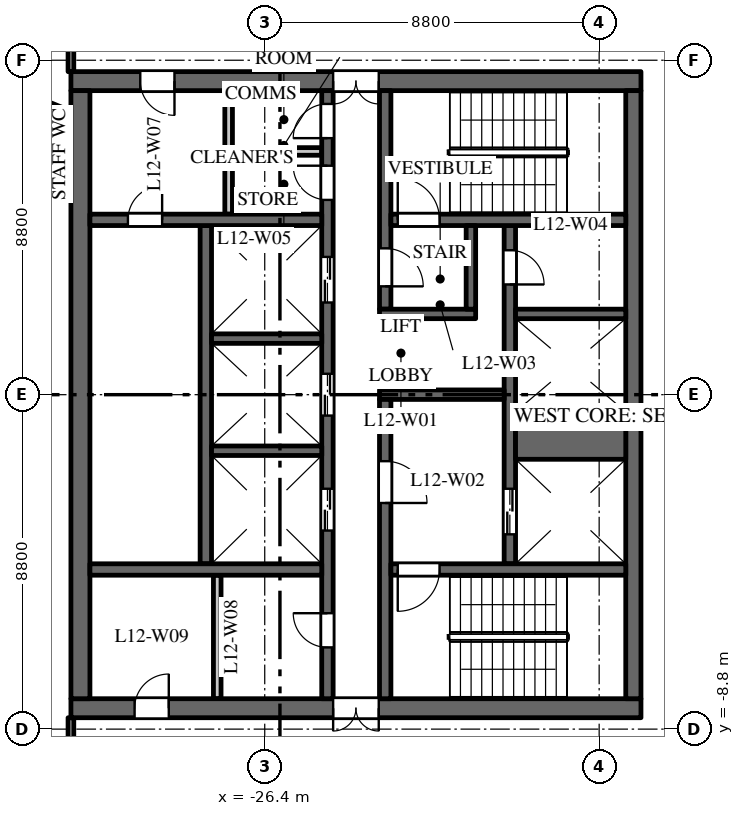
"""IFC4 building model, lengths in metres.
Left out: names, types, materials, properties, quantities, classifications, styles, units other than length and angle.
Written with IfcOpenShell. Run it as: python <this file> out.ifc"""

import sys

from ifc_helpers import new_model, si_unit, direction, frame, frame_2d, origin, place, context, subcontext, project, spatial, rectangle, extrude, element, fill, save


model = new_model("IFC4")
c1 = context("Model", 3, precision=1e-05, world=origin(), true_north=direction((0.0, 1.0)))
c2 = subcontext(c1, "Body", "Model", "MODEL_VIEW")
j1 = project(units=[si_unit("LENGTHUNIT", "METRE"), si_unit("PLANEANGLEUNIT", "RADIAN")], contexts=[c1])
p1 = place(None, origin())
s1 = spatial("IfcSite", under=j1, at=p1, CompositionType="ELEMENT")
p2 = place(p1, origin())
s2 = spatial("IfcBuilding", under=s1, at=p2, CompositionType="ELEMENT")
p3 = place(p2, frame((0.0, 0.0, 58.5)))
s3 = spatial("IfcBuildingStorey", under=s2, at=p3, CompositionType="ELEMENT", Elevation=58.5)
p4 = place(p3, frame((-16.5, 8.25, 0.0), z_axis=(0.0, 0.0, 1.0), x_axis=(-1.0, 0.0, 0.0)))
e1 = element("IfcWall", 1, at=p4, inside=s3, PredefinedType="SHEAR", context=c2, shape_type="SweptSolid", body=[
    extrude(rectangle(XDim=15.0, YDim=0.5, at=frame_2d((7.5, 0.0))), origin(), (0.0, 0.0, 1.0), 3.7),
])
p5 = place(p4, frame((6.9, 0.0, 0.0)))
e2 = element("IfcOpeningElement", 2, at=p5, cuts=e1, PredefinedType="OPENING", context=c2, shape_type="SweptSolid", body=[
    extrude(rectangle(XDim=1.2, YDim=2.1, at=frame_2d((0.6, 1.05))), frame((0.0, 0.26, 0.0), z_axis=(0.0, -1.0, 0.0), x_axis=(1.0, 0.0, 0.0)), (0.0, 0.0, 1.0), 0.52),
])
p6 = place(p4, frame((12.275, 0.0, 0.0)))
e3 = element("IfcOpeningElement", 3, at=p6, cuts=e1, PredefinedType="OPENING", context=c2, shape_type="SweptSolid", body=[
    extrude(rectangle(XDim=0.9, YDim=2.1, at=frame_2d((0.45, 1.05))), frame((0.0, 0.26, 0.0), z_axis=(0.0, -1.0, 0.0), x_axis=(1.0, 0.0, 0.0)), (0.0, 0.0, 1.0), 0.52),
])
p7 = place(p3, frame((-16.5, -8.25, 0.0), z_axis=(0.0, 0.0, 1.0), x_axis=(-1.0, 0.0, 0.0)))
e4 = element("IfcWall", 4, at=p7, inside=s3, PredefinedType="SHEAR", context=c2, shape_type="SweptSolid", body=[
    extrude(rectangle(XDim=15.0, YDim=0.5, at=frame_2d((7.5, 0.0))), origin(), (0.0, 0.0, 1.0), 3.7),
])
p8 = place(p7, frame((6.9, 0.0, 0.0)))
e5 = element("IfcOpeningElement", 5, at=p8, cuts=e4, PredefinedType="OPENING", context=c2, shape_type="SweptSolid", body=[
    extrude(rectangle(XDim=1.2, YDim=2.1, at=frame_2d((0.6, 1.05))), frame((0.0, 0.26, 0.0), z_axis=(0.0, -1.0, 0.0), x_axis=(1.0, 0.0, 0.0)), (0.0, 0.0, 1.0), 0.52),
])
p9 = place(p7, frame((12.425, 0.0, 0.0)))
e6 = element("IfcOpeningElement", 6, at=p9, cuts=e4, PredefinedType="OPENING", context=c2, shape_type="SweptSolid", body=[
    extrude(rectangle(XDim=0.9, YDim=2.1, at=frame_2d((0.45, 1.05))), frame((0.0, 0.26, 0.0), z_axis=(0.0, -1.0, 0.0), x_axis=(1.0, 0.0, 0.0)), (0.0, 0.0, 1.0), 0.52),
])
p10 = place(p3, frame((-27.95, -4.45, 0.0), z_axis=(0.0, 0.0, 1.0), x_axis=(0.0, 1.0, 0.0)))
e7 = element("IfcWall", 7, at=p10, inside=s3, PredefinedType="SHEAR", context=c2, shape_type="SweptSolid", body=[
    extrude(rectangle(XDim=8.9, YDim=0.3, at=frame_2d((4.45, 0.0))), origin(), (0.0, 0.0, 1.0), 3.7),
])
p11 = place(p3, frame((-19.95, -4.45, 0.0), z_axis=(0.0, 0.0, 1.0), x_axis=(0.0, 1.0, 0.0)))
e8 = element("IfcWall", 8, at=p11, inside=s3, PredefinedType="SHEAR", context=c2, shape_type="SweptSolid", body=[
    extrude(rectangle(XDim=8.9, YDim=0.3, at=frame_2d((4.45, 0.0))), origin(), (0.0, 0.0, 1.0), 3.7),
])
p12 = place(p11, frame((0.775, 0.0, 0.0)))
e9 = element("IfcOpeningElement", 9, at=p12, cuts=e8, PredefinedType="OPENING", context=c2, shape_type="SweptSolid", body=[
    extrude(rectangle(XDim=1.2, YDim=2.1, at=frame_2d((0.6, 1.05))), frame((0.0, 0.16, 0.0), z_axis=(0.0, -1.0, 0.0), x_axis=(1.0, 0.0, 0.0)), (0.0, 0.0, 1.0), 0.32),
])
p13 = place(p11, frame((7.35, 0.0, 0.0)))
e10 = element("IfcOpeningElement", 10, at=p13, cuts=e8, PredefinedType="OPENING", context=c2, shape_type="SweptSolid", body=[
    extrude(rectangle(XDim=0.9, YDim=2.1, at=frame_2d((0.45, 1.05))), frame((0.0, 0.16, 0.0), z_axis=(0.0, -1.0, 0.0), x_axis=(1.0, 0.0, 0.0)), (0.0, 0.0, 1.0), 0.32),
])
p14 = place(p3, frame((-24.75, -8.0, 0.0), z_axis=(0.0, 0.0, 1.0), x_axis=(0.0, 1.0, 0.0)))
e11 = element("IfcWall", 11, at=p14, inside=s3, PredefinedType="SHEAR", context=c2, shape_type="SweptSolid", body=[
    extrude(rectangle(XDim=16.0, YDim=0.3, at=frame_2d((8.0, 0.0))), origin(), (0.0, 0.0, 1.0), 3.7),
])
p15 = place(p14, frame((4.425, 0.0, 0.0)))
e12 = element("IfcOpeningElement", 12, at=p15, cuts=e11, PredefinedType="OPENING", context=c2, shape_type="SweptSolid", body=[
    extrude(rectangle(XDim=1.1, YDim=2.1, at=frame_2d((0.55, 1.05))), frame((0.0, 0.16, 0.0), z_axis=(0.0, -1.0, 0.0), x_axis=(1.0, 0.0, 0.0)), (0.0, 0.0, 1.0), 0.32),
])
p16 = place(p14, frame((7.45, 0.0, 0.0)))
e13 = element("IfcOpeningElement", 13, at=p16, cuts=e11, PredefinedType="OPENING", context=c2, shape_type="SweptSolid", body=[
    extrude(rectangle(XDim=1.1, YDim=2.1, at=frame_2d((0.55, 1.05))), frame((0.0, 0.16, 0.0), z_axis=(0.0, -1.0, 0.0), x_axis=(1.0, 0.0, 0.0)), (0.0, 0.0, 1.0), 0.32),
])
p17 = place(p14, frame((10.425, 0.0, 0.0)))
e14 = element("IfcOpeningElement", 14, at=p17, cuts=e11, PredefinedType="OPENING", context=c2, shape_type="SweptSolid", body=[
    extrude(rectangle(XDim=1.2, YDim=2.1, at=frame_2d((0.6, 1.05))), frame((0.0, 0.16, 0.0), z_axis=(0.0, -1.0, 0.0), x_axis=(1.0, 0.0, 0.0)), (0.0, 0.0, 1.0), 0.32),
])
p18 = place(p14, frame((13.125, 0.0, 0.0)))
e15 = element("IfcOpeningElement", 15, at=p18, cuts=e11, PredefinedType="OPENING", context=c2, shape_type="SweptSolid", body=[
    extrude(rectangle(XDim=0.9, YDim=2.1, at=frame_2d((0.45, 1.05))), frame((0.0, 0.16, 0.0), z_axis=(0.0, -1.0, 0.0), x_axis=(1.0, 0.0, 0.0)), (0.0, 0.0, 1.0), 0.32),
])
p19 = place(p14, frame((14.75, 0.0, 0.0)))
e16 = element("IfcOpeningElement", 16, at=p19, cuts=e11, PredefinedType="OPENING", context=c2, shape_type="SweptSolid", body=[
    extrude(rectangle(XDim=0.9, YDim=2.1, at=frame_2d((0.45, 1.05))), frame((0.0, 0.16, 0.0), z_axis=(0.0, -1.0, 0.0), x_axis=(1.0, 0.0, 0.0)), (0.0, 0.0, 1.0), 0.32),
])
p20 = place(p14, frame((1.35, 0.0, 0.0)))
e17 = element("IfcOpeningElement", 17, at=p20, cuts=e11, PredefinedType="OPENING", context=c2, shape_type="SweptSolid", body=[
    extrude(rectangle(XDim=0.9, YDim=2.1, at=frame_2d((0.45, 1.05))), frame((0.0, 0.16, 0.0), z_axis=(0.0, -1.0, 0.0), x_axis=(1.0, 0.0, 0.0)), (0.0, 0.0, 1.0), 0.32),
])
p21 = place(p3, frame((-20.1, 0.0, 0.0), z_axis=(0.0, 0.0, 1.0), x_axis=(-1.0, 0.0, 0.0)))
e18 = element("IfcWall", 18, at=p21, inside=s3, PredefinedType="SHEAR", context=c2, shape_type="SweptSolid", body=[
    extrude(rectangle(XDim=3.28, YDim=0.25, at=frame_2d((1.64, 0.0))), origin(), (0.0, 0.0, 1.0), 3.7),
])
p22 = place(p3, frame((-16.7, -8.0, 0.0), z_axis=(0.0, 0.0, 1.0), x_axis=(0.0, 1.0, 0.0)))
e19 = element("IfcWall", 19, at=p22, inside=s3, PredefinedType="SHEAR", context=c2, shape_type="SweptSolid", body=[
    extrude(rectangle(XDim=16.0, YDim=0.4, at=frame_2d((8.0, 0.0))), origin(), (0.0, 0.0, 1.0), 3.7),
])
p23 = place(p3, frame((-31.25, -8.0, 0.0), z_axis=(0.0, 0.0, 1.0), x_axis=(0.0, 1.0, 0.0)))
e20 = element("IfcWall", 20, at=p23, inside=s3, PredefinedType="SHEAR", context=c2, shape_type="SweptSolid", body=[
    extrude(rectangle(XDim=16.0, YDim=0.5, at=frame_2d((8.0, 0.0))), origin(), (0.0, 0.0, 1.0), 3.7),
])
p24 = place(p3, frame((-24.9, 4.6, 0.0), z_axis=(0.0, 0.0, 1.0), x_axis=(-1.0, 0.0, 0.0)))
e21 = element("IfcWall", 21, at=p24, inside=s3, PredefinedType="SHEAR", context=c2, shape_type="SweptSolid", body=[
    extrude(rectangle(XDim=6.1, YDim=0.3, at=frame_2d((3.05, 0.0))), origin(), (0.0, 0.0, 1.0), 3.7),
])
p25 = place(p24, frame((4.2, 0.0, 0.0)))
e22 = element("IfcOpeningElement", 22, at=p25, cuts=e21, PredefinedType="OPENING", context=c2, shape_type="SweptSolid", body=[
    extrude(rectangle(XDim=0.9, YDim=2.1, at=frame_2d((0.45, 1.05))), frame((0.0, 0.16, 0.0), z_axis=(0.0, -1.0, 0.0), x_axis=(1.0, 0.0, 0.0)), (0.0, 0.0, 1.0), 0.32),
])
for number, where, z_axis, x_axis in (
    (23, (-27.35, 4.75, 0.0), (0.0, 0.0, 1.0), (0.0, 1.0, 0.0)),
    (24, (-27.65, -8.0, 0.0), (0.0, 0.0, 1.0), (0.0, 1.0, 0.0)),
):
    element("IfcWall", number, at=place(p3, frame(where, z_axis=z_axis, x_axis=x_axis)), inside=s3, PredefinedType="PARTITIONING", context=c2, shape_type="SweptSolid", body=[
        extrude(rectangle(XDim=3.25, YDim=0.2, at=frame_2d((1.625, 0.0))), origin(), (0.0, 0.0, 1.0), 3.7),
    ])
p26 = place(p3, frame((-24.9, 6.4, 0.0), z_axis=(0.0, 0.0, 1.0), x_axis=(-1.0, 0.0, 0.0)))
e25 = element("IfcWall", 25, at=p26, inside=s3, PredefinedType="PARTITIONING", context=c2, shape_type="SweptSolid", body=[
    extrude(rectangle(XDim=2.35, YDim=0.2, at=frame_2d((1.175, 0.0))), origin(), (0.0, 0.0, 1.0), 3.7),
])
p27 = place(p3, frame((-24.9, -4.6, 0.0), z_axis=(0.0, 0.0, 1.0), x_axis=(-1.0, 0.0, 0.0)))
e26 = element("IfcWall", 26, at=p27, inside=s3, PredefinedType="SHEAR", context=c2, shape_type="SweptSolid", body=[
    extrude(rectangle(XDim=6.1, YDim=0.3, at=frame_2d((3.05, 0.0))), origin(), (0.0, 0.0, 1.0), 3.7),
])
p28 = place(p3, frame((-16.9, -1.075, 0.0), z_axis=(0.0, 0.0, 1.0), x_axis=(-1.0, 0.0, 0.0)))
e27 = element("IfcWall", 27, at=p28, inside=s3, PredefinedType="SHEAR", context=c2, shape_type="SweptSolid", body=[
    extrude(rectangle(XDim=2.9, YDim=1.25, at=frame_2d((1.45, 0.0))), origin(), (0.0, 0.0, 1.0), 3.7),
])
for number, where, z_axis, x_axis in (
    (28, (-16.9, 2.125, 0.0), (0.0, 0.0, 1.0), (-1.0, 0.0, 0.0)),
    (29, (-24.9, -1.475, 0.0), (0.0, 0.0, 1.0), (-1.0, 0.0, 0.0)),
    (30, (-24.9, 1.475, 0.0), (0.0, 0.0, 1.0), (-1.0, 0.0, 0.0)),
):
    element("IfcWall", number, at=place(p3, frame(where, z_axis=z_axis, x_axis=x_axis)), inside=s3, PredefinedType="SHEAR", context=c2, shape_type="SweptSolid", body=[
        extrude(rectangle(XDim=2.9, YDim=0.25, at=frame_2d((1.45, 0.0))), origin(), (0.0, 0.0, 1.0), 3.7),
    ])
p29 = place(p3, frame((-23.23, 2.25, 0.0), z_axis=(0.0, 0.0, 1.0), x_axis=(0.0, 1.0, 0.0)))
e31 = element("IfcWall", 31, at=p29, inside=s3, PredefinedType="SHEAR", context=c2, shape_type="SweptSolid", body=[
    extrude(rectangle(XDim=5.75, YDim=0.3, at=frame_2d((2.875, 0.0))), origin(), (0.0, 0.0, 1.0), 3.7),
])
p30 = place(p29, frame((0.6, 0.0, 0.0)))
e32 = element("IfcOpeningElement", 32, at=p30, cuts=e31, PredefinedType="OPENING", context=c2, shape_type="SweptSolid", body=[
    extrude(rectangle(XDim=1.0, YDim=2.1, at=frame_2d((0.5, 1.05))), frame((0.0, 0.16, 0.0), z_axis=(0.0, -1.0, 0.0), x_axis=(1.0, 0.0, 0.0)), (0.0, 0.0, 1.0), 0.32),
])
p31 = place(p3, frame((-23.23, -8.0, 0.0), z_axis=(0.0, 0.0, 1.0), x_axis=(0.0, 1.0, 0.0)))
e33 = element("IfcWall", 33, at=p31, inside=s3, PredefinedType="SHEAR", context=c2, shape_type="SweptSolid", body=[
    extrude(rectangle(XDim=7.875, YDim=0.3, at=frame_2d((3.938, 0.0))), origin(), (0.0, 0.0, 1.0), 3.7),
])
p32 = place(p31, frame((5.15, 0.0, 0.0)))
e34 = element("IfcOpeningElement", 34, at=p32, cuts=e33, PredefinedType="OPENING", context=c2, shape_type="SweptSolid", body=[
    extrude(rectangle(XDim=1.1, YDim=2.1, at=frame_2d((0.55, 1.05))), frame((0.0, 0.16, 0.0), z_axis=(0.0, -1.0, 0.0), x_axis=(1.0, 0.0, 0.0)), (0.0, 0.0, 1.0), 0.32),
])
p33 = place(p3, frame((-16.9, 4.6, 0.0), z_axis=(0.0, 0.0, 1.0), x_axis=(-1.0, 0.0, 0.0)))
e35 = element("IfcWall", 35, at=p33, inside=s3, PredefinedType="SHEAR", context=c2, shape_type="SweptSolid", body=[
    extrude(rectangle(XDim=6.18, YDim=0.3, at=frame_2d((3.09, 0.0))), origin(), (0.0, 0.0, 1.0), 3.7),
])
p34 = place(p33, frame((4.9, 0.0, 0.0)))
e36 = element("IfcOpeningElement", 36, at=p34, cuts=e35, PredefinedType="OPENING", context=c2, shape_type="SweptSolid", body=[
    extrude(rectangle(XDim=1.1, YDim=2.1, at=frame_2d((0.55, 1.05))), frame((0.0, 0.16, 0.0), z_axis=(0.0, -1.0, 0.0), x_axis=(1.0, 0.0, 0.0)), (0.0, 0.0, 1.0), 0.32),
])
p35 = place(p3, frame((-16.9, -4.6, 0.0), z_axis=(0.0, 0.0, 1.0), x_axis=(-1.0, 0.0, 0.0)))
e37 = element("IfcWall", 37, at=p35, inside=s3, PredefinedType="SHEAR", context=c2, shape_type="SweptSolid", body=[
    extrude(rectangle(XDim=6.18, YDim=0.3, at=frame_2d((3.09, 0.0))), origin(), (0.0, 0.0, 1.0), 3.7),
])
p36 = place(p35, frame((4.9, 0.0, 0.0)))
e38 = element("IfcOpeningElement", 38, at=p36, cuts=e37, PredefinedType="OPENING", context=c2, shape_type="SweptSolid", body=[
    extrude(rectangle(XDim=1.1, YDim=2.1, at=frame_2d((0.55, 1.05))), frame((0.0, 0.16, 0.0), z_axis=(0.0, -1.0, 0.0), x_axis=(1.0, 0.0, 0.0)), (0.0, 0.0, 1.0), 0.32),
])
p37 = place(p3, frame((-20.85, 2.125, 0.0), z_axis=(0.0, 0.0, 1.0), x_axis=(-1.0, 0.0, 0.0)))
e39 = element("IfcWall", 39, at=p37, inside=s3, PredefinedType="SHEAR", context=c2, shape_type="SweptSolid", body=[
    extrude(rectangle(XDim=2.53, YDim=0.25, at=frame_2d((1.265, 0.0))), origin(), (0.0, 0.0, 1.0), 3.7),
])
p38 = place(p3, frame((-20.975, 2.25, 0.0), z_axis=(0.0, 0.0, 1.0), x_axis=(0.0, 1.0, 0.0)))
e40 = element("IfcWall", 40, at=p38, inside=s3, PredefinedType="SHEAR", context=c2, shape_type="SweptSolid", body=[
    extrude(rectangle(XDim=2.2, YDim=0.25, at=frame_2d((1.1, 0.0))), origin(), (0.0, 0.0, 1.0), 3.7),
])
p39 = place(p3, frame((-34.234, 8.53, 0.0), z_axis=(0.0, 0.0, 1.0), x_axis=(0.925344112436, -0.379128307542, 0.0)))
e41 = element("IfcWall", 41, at=p39, inside=s3, PredefinedType="PARTITIONING", context=c2, shape_type="SweptSolid", body=[
    extrude(rectangle(XDim=2.954, YDim=0.1, at=frame_2d((1.477, 0.0))), origin(), (0.0, 0.0, 1.0), 2.85),
])
for number, where, z_axis, x_axis in (
    (42, (-31.5, -10.7, 0.0), (0.0, 0.0, 1.0), (0.0, 1.0, 0.0)),
    (43, (-31.5, 8.5, 0.0), (0.0, 0.0, 1.0), (0.0, 1.0, 0.0)),
):
    element("IfcWall", number, at=place(p3, frame(where, z_axis=z_axis, x_axis=x_axis)), inside=s3, PredefinedType="PARTITIONING", context=c2, shape_type="SweptSolid", body=[
        extrude(rectangle(XDim=2.2, YDim=0.15, at=frame_2d((1.1, 0.0))), origin(), (0.0, 0.0, 1.0), 3.7),
    ])
p40 = place(p12, origin())
e44 = element("IfcDoor", 44, at=p40, inside=s3, OperationType="DOUBLE_DOOR_SLIDING", PredefinedType="DOOR", context=c2, shape_type="SweptSolid", body=[
    extrude(rectangle(XDim=1.2, YDim=2.1, at=frame_2d((0.6, 1.05))), frame((0.0, 0.025, 0.0), z_axis=(0.0, -1.0, 0.0), x_axis=(1.0, 0.0, 0.0)), (0.0, 0.0, 1.0), 0.05),
])
fill(e9, e44)
p41 = place(p15, origin())
e45 = element("IfcDoor", 45, at=p41, inside=s3, OperationType="DOUBLE_DOOR_SLIDING", PredefinedType="DOOR", context=c2, shape_type="SweptSolid", body=[
    extrude(rectangle(XDim=1.1, YDim=2.1, at=frame_2d((0.55, 1.05))), frame((0.0, 0.025, 0.0), z_axis=(0.0, -1.0, 0.0), x_axis=(1.0, 0.0, 0.0)), (0.0, 0.0, 1.0), 0.05),
])
fill(e12, e45)
p42 = place(p16, origin())
e46 = element("IfcDoor", 46, at=p42, inside=s3, OperationType="DOUBLE_DOOR_SLIDING", PredefinedType="DOOR", context=c2, shape_type="SweptSolid", body=[
    extrude(rectangle(XDim=1.1, YDim=2.1, at=frame_2d((0.55, 1.05))), frame((0.0, 0.025, 0.0), z_axis=(0.0, -1.0, 0.0), x_axis=(1.0, 0.0, 0.0)), (0.0, 0.0, 1.0), 0.05),
])
fill(e13, e46)
p43 = place(p17, origin())
e47 = element("IfcDoor", 47, at=p43, inside=s3, OperationType="DOUBLE_DOOR_SLIDING", PredefinedType="DOOR", context=c2, shape_type="SweptSolid", body=[
    extrude(rectangle(XDim=1.2, YDim=2.1, at=frame_2d((0.6, 1.05))), frame((0.0, 0.025, 0.0), z_axis=(0.0, -1.0, 0.0), x_axis=(1.0, 0.0, 0.0)), (0.0, 0.0, 1.0), 0.05),
])
fill(e14, e47)
p44 = place(p34, origin())
e48 = element("IfcDoor", 48, at=p44, inside=s3, OperationType="SINGLE_SWING_RIGHT", PredefinedType="DOOR", context=c2, shape_type="SweptSolid", body=[
    extrude(rectangle(XDim=1.1, YDim=2.1, at=frame_2d((0.55, 1.05))), frame((0.0, 0.025, 0.0), z_axis=(0.0, -1.0, 0.0), x_axis=(1.0, 0.0, 0.0)), (0.0, 0.0, 1.0), 0.05),
])
fill(e36, e48)
p45 = place(p36, origin())
e49 = element("IfcDoor", 49, at=p45, inside=s3, OperationType="SINGLE_SWING_LEFT", PredefinedType="DOOR", context=c2, shape_type="SweptSolid", body=[
    extrude(rectangle(XDim=1.1, YDim=2.1, at=frame_2d((0.55, 1.05))), frame((0.0, 0.025, 0.0), z_axis=(0.0, -1.0, 0.0), x_axis=(1.0, 0.0, 0.0)), (0.0, 0.0, 1.0), 0.05),
])
fill(e38, e49)
p46 = place(p32, origin())
e50 = element("IfcDoor", 50, at=p46, inside=s3, OperationType="SINGLE_SWING_LEFT", PredefinedType="DOOR", context=c2, shape_type="SweptSolid", body=[
    extrude(rectangle(XDim=1.1, YDim=2.1, at=frame_2d((0.55, 1.05))), frame((0.0, 0.025, 0.0), z_axis=(0.0, -1.0, 0.0), x_axis=(1.0, 0.0, 0.0)), (0.0, 0.0, 1.0), 0.05),
])
fill(e34, e50)
p47 = place(p30, origin())
e51 = element("IfcDoor", 51, at=p47, inside=s3, OperationType="SINGLE_SWING_LEFT", PredefinedType="DOOR", context=c2, shape_type="SweptSolid", body=[
    extrude(rectangle(XDim=1.0, YDim=2.1, at=frame_2d((0.5, 1.05))), frame((0.0, 0.025, 0.0), z_axis=(0.0, -1.0, 0.0), x_axis=(1.0, 0.0, 0.0)), (0.0, 0.0, 1.0), 0.05),
])
fill(e32, e51)
p48 = place(p5, origin())
e52 = element("IfcDoor", 52, at=p48, inside=s3, OperationType="DOUBLE_DOOR_DOUBLE_SWING", PredefinedType="DOOR", context=c2, shape_type="SweptSolid", body=[
    extrude(rectangle(XDim=1.2, YDim=2.1, at=frame_2d((0.6, 1.05))), frame((0.0, 0.025, 0.0), z_axis=(0.0, -1.0, 0.0), x_axis=(1.0, 0.0, 0.0)), (0.0, 0.0, 1.0), 0.05),
])
fill(e2, e52)
p49 = place(p8, origin())
e53 = element("IfcDoor", 53, at=p49, inside=s3, OperationType="DOUBLE_DOOR_DOUBLE_SWING", PredefinedType="DOOR", context=c2, shape_type="SweptSolid", body=[
    extrude(rectangle(XDim=1.2, YDim=2.1, at=frame_2d((0.6, 1.05))), frame((0.0, 0.025, 0.0), z_axis=(0.0, -1.0, 0.0), x_axis=(1.0, 0.0, 0.0)), (0.0, 0.0, 1.0), 0.05),
])
fill(e5, e53)
p50 = place(p13, origin())
e54 = element("IfcDoor", 54, at=p50, inside=s3, OperationType="SINGLE_SWING_LEFT", PredefinedType="DOOR", context=c2, shape_type="SweptSolid", body=[
    extrude(rectangle(XDim=0.9, YDim=2.1, at=frame_2d((0.45, 1.05))), frame((0.0, 0.025, 0.0), z_axis=(0.0, -1.0, 0.0), x_axis=(1.0, 0.0, 0.0)), (0.0, 0.0, 1.0), 0.05),
])
fill(e10, e54)
p51 = place(p18, origin())
e55 = element("IfcDoor", 55, at=p51, inside=s3, OperationType="SINGLE_SWING_LEFT", PredefinedType="DOOR", context=c2, shape_type="SweptSolid", body=[
    extrude(rectangle(XDim=0.9, YDim=2.1, at=frame_2d((0.45, 1.05))), frame((0.0, 0.025, 0.0), z_axis=(0.0, -1.0, 0.0), x_axis=(1.0, 0.0, 0.0)), (0.0, 0.0, 1.0), 0.05),
])
fill(e15, e55)
p52 = place(p19, origin())
e56 = element("IfcDoor", 56, at=p52, inside=s3, OperationType="SINGLE_SWING_RIGHT", PredefinedType="DOOR", context=c2, shape_type="SweptSolid", body=[
    extrude(rectangle(XDim=0.9, YDim=2.1, at=frame_2d((0.45, 1.05))), frame((0.0, 0.025, 0.0), z_axis=(0.0, -1.0, 0.0), x_axis=(1.0, 0.0, 0.0)), (0.0, 0.0, 1.0), 0.05),
])
fill(e16, e56)
p53 = place(p6, origin())
e57 = element("IfcDoor", 57, at=p53, inside=s3, OperationType="SINGLE_SWING_RIGHT", PredefinedType="DOOR", context=c2, shape_type="SweptSolid", body=[
    extrude(rectangle(XDim=0.9, YDim=2.1, at=frame_2d((0.45, 1.05))), frame((0.0, 0.025, 0.0), z_axis=(0.0, -1.0, 0.0), x_axis=(1.0, 0.0, 0.0)), (0.0, 0.0, 1.0), 0.05),
])
fill(e3, e57)
p54 = place(p20, origin())
e58 = element("IfcDoor", 58, at=p54, inside=s3, OperationType="SINGLE_SWING_LEFT", PredefinedType="DOOR", context=c2, shape_type="SweptSolid", body=[
    extrude(rectangle(XDim=0.9, YDim=2.1, at=frame_2d((0.45, 1.05))), frame((0.0, 0.025, 0.0), z_axis=(0.0, -1.0, 0.0), x_axis=(1.0, 0.0, 0.0)), (0.0, 0.0, 1.0), 0.05),
])
fill(e17, e58)
p55 = place(p9, origin())
e59 = element("IfcDoor", 59, at=p55, inside=s3, OperationType="SINGLE_SWING_LEFT", PredefinedType="DOOR", context=c2, shape_type="SweptSolid", body=[
    extrude(rectangle(XDim=0.9, YDim=2.1, at=frame_2d((0.45, 1.05))), frame((0.0, 0.025, 0.0), z_axis=(0.0, -1.0, 0.0), x_axis=(1.0, 0.0, 0.0)), (0.0, 0.0, 1.0), 0.05),
])
fill(e6, e59)
p56 = place(p25, origin())
e60 = element("IfcDoor", 60, at=p56, inside=s3, OperationType="SINGLE_SWING_LEFT", PredefinedType="DOOR", context=c2, shape_type="SweptSolid", body=[
    extrude(rectangle(XDim=0.9, YDim=2.1, at=frame_2d((0.45, 1.05))), frame((0.0, 0.025, 0.0), z_axis=(0.0, -1.0, 0.0), x_axis=(1.0, 0.0, 0.0)), (0.0, 0.0, 1.0), 0.05),
])
fill(e22, e60)
save(model, sys.argv[1])
